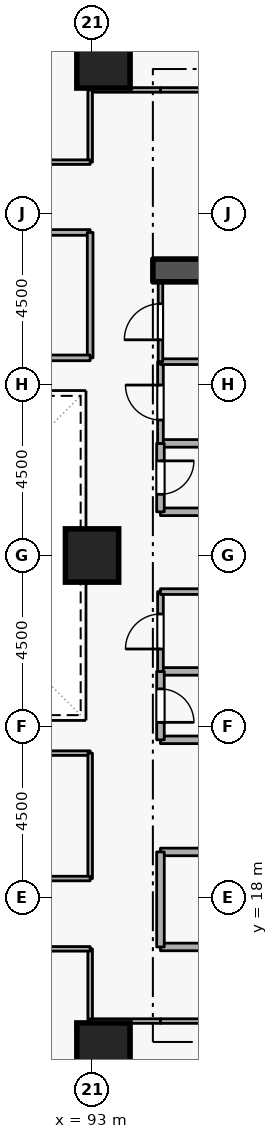
"""IFC4 building model, lengths in metres.
Left out: names, types, materials, properties, quantities, classifications, styles, units other than length and angle.
Written with IfcOpenShell. Run it as: python <this file> out.ifc"""

import sys

from ifc_helpers import new_model, si_unit, direction, frame, frame_2d, origin, origin_2d, place, context, subcontext, project, spatial, rectangle, extrude, element, fill, save


model = new_model("IFC4")
c1 = context("Model", 3, precision=1e-05, world=origin(), true_north=direction((0.0, 1.0)))
c2 = subcontext(c1, "Body", "Model", "MODEL_VIEW")
j1 = project(units=[si_unit("LENGTHUNIT", "METRE"), si_unit("PLANEANGLEUNIT", "RADIAN")], contexts=[c1])
p1 = place(None, origin())
s1 = spatial("IfcSite", under=j1, at=p1, CompositionType="ELEMENT")
p2 = place(p1, origin())
s2 = spatial("IfcBuilding", under=s1, at=p2, CompositionType="ELEMENT")
p3 = place(p2, frame((0.0, 0.0, 38.7)))
s3 = spatial("IfcBuildingStorey", under=s2, at=p3, CompositionType="ELEMENT", Elevation=38.7)
p4 = place(p3, frame((94.6, 34.5, 0.0), z_axis=(0.0, 0.0, 1.0), x_axis=(1.0, 0.0, 0.0)))
e1 = element("IfcWall", 1, at=p4, inside=s3, PredefinedType="SHEAR", context=c2, shape_type="SweptSolid", body=[
    extrude(rectangle(XDim=5.7, YDim=0.6, at=frame_2d((2.85, 0.0))), origin(), (0.0, 0.0, 1.0), 3.6),
])
for number, where, z_axis, x_axis in (
    (2, (93.3, 14.0, 0.0), (0.0, 0.0, 1.0), (1.0, 0.0, 0.0)),
    (3, (93.3, 40.0, 0.0), (0.0, 0.0, 1.0), (1.0, 0.0, 0.0)),
    (4, (93.0, 27.0, 0.0), (0.0, 0.0, 1.0), (1.0, 0.0, 0.0)),
):
    element("IfcColumn", number, at=place(p3, frame(where, z_axis=z_axis, x_axis=x_axis)), inside=s3, PredefinedType="COLUMN", context=c2, shape_type="SweptSolid", body=[
        extrude(rectangle(XDim=1.4, YDim=1.4, at=origin_2d()), origin(), (0.0, 0.0, 1.0), 3.6),
    ])
p5 = place(p3, frame((94.8, 16.7, 0.0), z_axis=(0.0, 0.0, 1.0), x_axis=(1.0, 0.0, 0.0)))
e5 = element("IfcWall", 5, at=p5, inside=s3, PredefinedType="STANDARD", context=c2, shape_type="SweptSolid", body=[
    extrude(rectangle(XDim=5.7, YDim=0.2, at=frame_2d((2.85, 0.0))), origin(), (0.0, 0.0, 1.0), 3.34),
])
p6 = place(p5, frame((2.275, 0.0, 0.0)))
e6 = element("IfcOpeningElement", 6, at=p6, cuts=e5, PredefinedType="OPENING", context=c2, shape_type="SweptSolid", body=[
    extrude(rectangle(XDim=1.15, YDim=2.1, at=frame_2d((0.575, 1.05))), frame((0.0, 0.11, 0.0), z_axis=(0.0, -1.0, 0.0), x_axis=(1.0, 0.0, 0.0)), (0.0, 0.0, 1.0), 0.22),
])
p7 = place(p3, frame((97.1, 19.2, 0.0), z_axis=(0.0, 0.0, 1.0), x_axis=(-1.0, 0.0, 0.0)))
e7 = element("IfcWall", 7, at=p7, inside=s3, PredefinedType="STANDARD", context=c2, shape_type="SweptSolid", body=[
    extrude(rectangle(XDim=2.3, YDim=0.2, at=frame_2d((1.15, 0.0))), origin(), (0.0, 0.0, 1.0), 2.545),
])
p8 = place(p3, frame((94.8, 19.2, 0.0), z_axis=(0.0, 0.0, 1.0), x_axis=(0.0, -1.0, 0.0)))
e8 = element("IfcWall", 8, at=p8, inside=s3, PredefinedType="STANDARD", context=c2, shape_type="SweptSolid", body=[
    extrude(rectangle(XDim=2.5, YDim=0.2, at=frame_2d((1.25, 0.0))), origin(), (0.0, 0.0, 1.0), 3.34),
])
for number, where, z_axis, x_axis in (
    (9, (94.8, 28.15, 0.0), (0.0, 0.0, 1.0), (1.0, 0.0, 0.0)),
    (10, (96.85, 29.95, 0.0), (0.0, 0.0, 1.0), (-1.0, 0.0, 0.0)),
):
    element("IfcWall", number, at=place(p3, frame(where, z_axis=z_axis, x_axis=x_axis)), inside=s3, PredefinedType="STANDARD", context=c2, shape_type="SweptSolid", body=[
        extrude(rectangle(XDim=2.05, YDim=0.2, at=frame_2d((1.025, 0.0))), origin(), (0.0, 0.0, 1.0), 3.34),
    ])
p9 = place(p3, frame((94.8, 29.95, 0.0), z_axis=(0.0, 0.0, 1.0), x_axis=(0.0, -1.0, 0.0)))
e11 = element("IfcWall", 11, at=p9, inside=s3, PredefinedType="STANDARD", context=c2, shape_type="SweptSolid", body=[
    extrude(rectangle(XDim=1.8, YDim=0.2, at=frame_2d((0.9, 0.0))), origin(), (0.0, 0.0, 1.0), 3.34),
])
p10 = place(p9, frame((0.46, 0.0, 0.0)))
e12 = element("IfcOpeningElement", 12, at=p10, cuts=e11, PredefinedType="OPENING", context=c2, shape_type="SweptSolid", body=[
    extrude(rectangle(XDim=0.88, YDim=2.04, at=frame_2d((0.44, 1.02))), frame((0.0, 0.11, 0.0), z_axis=(0.0, -1.0, 0.0), x_axis=(1.0, 0.0, 0.0)), (0.0, 0.0, 1.0), 0.22),
])
for number, where, z_axis, x_axis in (
    (13, (94.8, 22.15, 0.0), (0.0, 0.0, 1.0), (1.0, 0.0, 0.0)),
    (14, (96.85, 23.95, 0.0), (0.0, 0.0, 1.0), (-1.0, 0.0, 0.0)),
):
    element("IfcWall", number, at=place(p3, frame(where, z_axis=z_axis, x_axis=x_axis)), inside=s3, PredefinedType="STANDARD", context=c2, shape_type="SweptSolid", body=[
        extrude(rectangle(XDim=2.05, YDim=0.2, at=frame_2d((1.025, 0.0))), origin(), (0.0, 0.0, 1.0), 3.34),
    ])
p11 = place(p3, frame((94.8, 23.95, 0.0), z_axis=(0.0, 0.0, 1.0), x_axis=(0.0, -1.0, 0.0)))
e15 = element("IfcWall", 15, at=p11, inside=s3, PredefinedType="STANDARD", context=c2, shape_type="SweptSolid", body=[
    extrude(rectangle(XDim=1.8, YDim=0.2, at=frame_2d((0.9, 0.0))), origin(), (0.0, 0.0, 1.0), 3.34),
])
p12 = place(p11, frame((0.46, 0.0, 0.0)))
e16 = element("IfcOpeningElement", 16, at=p12, cuts=e15, PredefinedType="OPENING", context=c2, shape_type="SweptSolid", body=[
    extrude(rectangle(XDim=0.88, YDim=2.04, at=frame_2d((0.44, 1.02))), frame((0.0, 0.11, 0.0), z_axis=(0.0, -1.0, 0.0), x_axis=(1.0, 0.0, 0.0)), (0.0, 0.0, 1.0), 0.22),
])
p13 = place(p3, frame((94.8, 23.95, 0.0), z_axis=(0.0, 0.0, 1.0), x_axis=(0.0, 1.0, 0.0)))
e17 = element("IfcWall", 17, at=p13, inside=s3, PredefinedType="PARTITIONING", context=c2, shape_type="SweptSolid", body=[
    extrude(rectangle(XDim=2.1, YDim=0.15, at=frame_2d((1.05, 0.0))), origin(), (0.0, 0.0, 1.0), 3.34),
])
p14 = place(p13, frame((0.59, 0.0, 0.0)))
e18 = element("IfcOpeningElement", 18, at=p14, cuts=e17, PredefinedType="OPENING", context=c2, shape_type="SweptSolid", body=[
    extrude(rectangle(XDim=0.92, YDim=2.08, at=frame_2d((0.46, 1.04))), frame((0.0, 0.085, 0.0), z_axis=(0.0, -1.0, 0.0), x_axis=(1.0, 0.0, 0.0)), (0.0, 0.0, 1.0), 0.17),
])
p15 = place(p3, frame((94.8, 26.05, 0.0), z_axis=(0.0, 0.0, 1.0), x_axis=(1.0, 0.0, 0.0)))
e19 = element("IfcWall", 19, at=p15, inside=s3, PredefinedType="PARTITIONING", context=c2, shape_type="SweptSolid", body=[
    extrude(rectangle(XDim=2.05, YDim=0.15, at=frame_2d((1.025, 0.0))), origin(), (0.0, 0.0, 1.0), 3.34),
])
p16 = place(p3, frame((94.8, 29.95, 0.0), z_axis=(0.0, 0.0, 1.0), x_axis=(0.0, 1.0, 0.0)))
e20 = element("IfcWall", 20, at=p16, inside=s3, PredefinedType="PARTITIONING", context=c2, shape_type="SweptSolid", body=[
    extrude(rectangle(XDim=2.15, YDim=0.15, at=frame_2d((1.075, 0.0))), origin(), (0.0, 0.0, 1.0), 3.34),
])
p17 = place(p16, frame((0.615, 0.0, 0.0)))
e21 = element("IfcOpeningElement", 21, at=p17, cuts=e20, PredefinedType="OPENING", context=c2, shape_type="SweptSolid", body=[
    extrude(rectangle(XDim=0.92, YDim=2.08, at=frame_2d((0.46, 1.04))), frame((0.0, 0.085, 0.0), z_axis=(0.0, -1.0, 0.0), x_axis=(1.0, 0.0, 0.0)), (0.0, 0.0, 1.0), 0.17),
])
p18 = place(p3, frame((94.8, 32.1, 0.0), z_axis=(0.0, 0.0, 1.0), x_axis=(1.0, 0.0, 0.0)))
e22 = element("IfcWall", 22, at=p18, inside=s3, PredefinedType="PARTITIONING", context=c2, shape_type="SweptSolid", body=[
    extrude(rectangle(XDim=2.05, YDim=0.15, at=frame_2d((1.025, 0.0))), origin(), (0.0, 0.0, 1.0), 3.34),
])
p19 = place(p3, frame((94.8, 32.1, 0.0), z_axis=(0.0, 0.0, 1.0), x_axis=(0.0, 1.0, 0.0)))
e23 = element("IfcWall", 23, at=p19, inside=s3, PredefinedType="PARTITIONING", context=c2, shape_type="SweptSolid", body=[
    extrude(rectangle(XDim=2.1, YDim=0.12, at=frame_2d((1.05, 0.0))), origin(), (0.0, 0.0, 1.0), 3.34),
])
p20 = place(p19, frame((0.575, 0.0, 0.0)))
e24 = element("IfcOpeningElement", 24, at=p20, cuts=e23, PredefinedType="OPENING", context=c2, shape_type="SweptSolid", body=[
    extrude(rectangle(XDim=0.95, YDim=2.1, at=frame_2d((0.475, 1.05))), frame((0.0, 0.07, 0.0), z_axis=(0.0, -1.0, 0.0), x_axis=(1.0, 0.0, 0.0)), (0.0, 0.0, 1.0), 0.14),
])
p21 = place(p3, frame((92.95, 16.65, 0.0), z_axis=(0.0, 0.0, 1.0), x_axis=(0.0, -1.0, 0.0)))
e25 = element("IfcWall", 25, at=p21, inside=s3, PredefinedType="PARTITIONING", context=c2, shape_type="SweptSolid", body=[
    extrude(rectangle(XDim=1.9, YDim=0.12, at=frame_2d((0.95, 0.0))), origin(), (0.0, 0.0, 1.0), 3.34),
])
p22 = place(p3, frame((92.95, 14.75, 0.0), z_axis=(0.0, 0.0, 1.0), x_axis=(1.0, 0.0, 0.0)))
e26 = element("IfcWall", 26, at=p22, inside=s3, PredefinedType="PARTITIONING", context=c2, shape_type="SweptSolid", body=[
    extrude(rectangle(XDim=1.85, YDim=0.12, at=frame_2d((0.925, 0.0))), origin(), (0.0, 0.0, 1.0), 3.34),
])
p23 = place(p3, frame((94.8, 14.75, 0.0), z_axis=(0.0, 0.0, 1.0), x_axis=(1.0, 0.0, 0.0)))
e27 = element("IfcWall", 27, at=p23, inside=s3, PredefinedType="PARTITIONING", context=c2, shape_type="SweptSolid", body=[
    extrude(rectangle(XDim=9.35, YDim=0.12, at=frame_2d((4.675, 0.0))), origin(), (0.0, 0.0, 1.0), 3.34),
])
p24 = place(p23, frame((4.15, 0.0, 0.0)))
e28 = element("IfcOpeningElement", 28, at=p24, cuts=e27, PredefinedType="OPENING", context=c2, shape_type="SweptSolid", body=[
    extrude(rectangle(XDim=1.05, YDim=2.1, at=frame_2d((0.525, 1.05))), frame((0.0, 0.07, 0.0), z_axis=(0.0, -1.0, 0.0), x_axis=(1.0, 0.0, 0.0)), (0.0, 0.0, 1.0), 0.14),
])
p25 = place(p3, frame((88.5, 16.65, 0.0), z_axis=(0.0, 0.0, 1.0), x_axis=(1.0, 0.0, 0.0)))
e29 = element("IfcWall", 29, at=p25, inside=s3, PredefinedType="PARTITIONING", context=c2, shape_type="SweptSolid", body=[
    extrude(rectangle(XDim=4.45, YDim=0.12, at=frame_2d((2.225, 0.0))), origin(), (0.0, 0.0, 1.0), 3.34),
])
p26 = place(p3, frame((97.95, 39.25, 0.0), z_axis=(0.0, 0.0, 1.0), x_axis=(-1.0, 0.0, 0.0)))
e30 = element("IfcWall", 30, at=p26, inside=s3, PredefinedType="PARTITIONING", context=c2, shape_type="SweptSolid", body=[
    extrude(rectangle(XDim=3.15, YDim=0.12, at=frame_2d((1.575, 0.0))), origin(), (0.0, 0.0, 1.0), 3.34),
])
p27 = place(p3, frame((94.8, 39.25, 0.0), z_axis=(0.0, 0.0, 1.0), x_axis=(-1.0, 0.0, 0.0)))
e31 = element("IfcWall", 31, at=p27, inside=s3, PredefinedType="PARTITIONING", context=c2, shape_type="SweptSolid", body=[
    extrude(rectangle(XDim=1.85, YDim=0.12, at=frame_2d((0.925, 0.0))), origin(), (0.0, 0.0, 1.0), 3.34),
])
p28 = place(p3, frame((92.95, 39.25, 0.0), z_axis=(0.0, 0.0, 1.0), x_axis=(0.0, -1.0, 0.0)))
e32 = element("IfcWall", 32, at=p28, inside=s3, PredefinedType="PARTITIONING", context=c2, shape_type="SweptSolid", body=[
    extrude(rectangle(XDim=1.9, YDim=0.12, at=frame_2d((0.95, 0.0))), origin(), (0.0, 0.0, 1.0), 3.34),
])
p29 = place(p3, frame((92.95, 37.35, 0.0), z_axis=(0.0, 0.0, 1.0), x_axis=(-1.0, 0.0, 0.0)))
e33 = element("IfcWall", 33, at=p29, inside=s3, PredefinedType="PARTITIONING", context=c2, shape_type="SweptSolid", body=[
    extrude(rectangle(XDim=4.45, YDim=0.12, at=frame_2d((2.225, 0.0))), origin(), (0.0, 0.0, 1.0), 3.34),
])
p30 = place(p29, frame((1.7, 0.0, 0.0)))
e34 = element("IfcOpeningElement", 34, at=p30, cuts=e33, PredefinedType="OPENING", context=c2, shape_type="SweptSolid", body=[
    extrude(rectangle(XDim=1.05, YDim=2.1, at=frame_2d((0.525, 1.05))), frame((0.0, 0.07, 0.0), z_axis=(0.0, -1.0, 0.0), x_axis=(1.0, 0.0, 0.0)), (0.0, 0.0, 1.0), 0.14),
])
p31 = place(p3, frame((84.05, 35.5, 0.0), z_axis=(0.0, 0.0, 1.0), x_axis=(1.0, 0.0, 0.0)))
e35 = element("IfcWall", 35, at=p31, inside=s3, PredefinedType="PARTITIONING", context=c2, shape_type="SweptSolid", body=[
    extrude(rectangle(XDim=8.9, YDim=0.15, at=frame_2d((4.45, 0.0))), origin(), (0.0, 0.0, 1.0), 3.34),
])
p32 = place(p31, frame((3.8, 0.0, 0.0)))
e36 = element("IfcOpeningElement", 36, at=p32, cuts=e35, PredefinedType="OPENING", context=c2, shape_type="SweptSolid", body=[
    extrude(rectangle(XDim=1.3, YDim=2.12, at=frame_2d((0.65, 1.06))), frame((0.0, 0.085, 0.0), z_axis=(0.0, -1.0, 0.0), x_axis=(1.0, 0.0, 0.0)), (0.0, 0.0, 1.0), 0.17),
])
p33 = place(p3, frame((92.95, 35.5, 0.0), z_axis=(0.0, 0.0, 1.0), x_axis=(0.0, -1.0, 0.0)))
e37 = element("IfcWall", 37, at=p33, inside=s3, PredefinedType="PARTITIONING", context=c2, shape_type="SweptSolid", body=[
    extrude(rectangle(XDim=3.3, YDim=0.15, at=frame_2d((1.65, 0.0))), origin(), (0.0, 0.0, 1.0), 3.34),
])
p34 = place(p3, frame((92.95, 32.2, 0.0), z_axis=(0.0, 0.0, 1.0), x_axis=(-1.0, 0.0, 0.0)))
e38 = element("IfcWall", 38, at=p34, inside=s3, PredefinedType="PARTITIONING", context=c2, shape_type="SweptSolid", body=[
    extrude(rectangle(XDim=8.9, YDim=0.15, at=frame_2d((4.45, 0.0))), origin(), (0.0, 0.0, 1.0), 3.34),
])
p35 = place(p3, frame((84.05, 21.8, 0.0), z_axis=(0.0, 0.0, 1.0), x_axis=(1.0, 0.0, 0.0)))
e39 = element("IfcWall", 39, at=p35, inside=s3, PredefinedType="PARTITIONING", context=c2, shape_type="SweptSolid", body=[
    extrude(rectangle(XDim=8.9, YDim=0.12, at=frame_2d((4.45, 0.0))), origin(), (0.0, 0.0, 1.0), 3.34),
])
p36 = place(p3, frame((92.95, 21.8, 0.0), z_axis=(0.0, 0.0, 1.0), x_axis=(0.0, -1.0, 0.0)))
e40 = element("IfcWall", 40, at=p36, inside=s3, PredefinedType="PARTITIONING", context=c2, shape_type="SweptSolid", body=[
    extrude(rectangle(XDim=3.3, YDim=0.12, at=frame_2d((1.65, 0.0))), origin(), (0.0, 0.0, 1.0), 3.34),
])
p37 = place(p3, frame((92.95, 18.5, 0.0), z_axis=(0.0, 0.0, 1.0), x_axis=(-1.0, 0.0, 0.0)))
e41 = element("IfcWall", 41, at=p37, inside=s3, PredefinedType="PARTITIONING", context=c2, shape_type="SweptSolid", body=[
    extrude(rectangle(XDim=8.9, YDim=0.12, at=frame_2d((4.45, 0.0))), origin(), (0.0, 0.0, 1.0), 3.34),
])
p38 = place(p37, frame((3.975, 0.0, 0.0)))
e42 = element("IfcOpeningElement", 42, at=p38, cuts=e41, PredefinedType="OPENING", context=c2, shape_type="SweptSolid", body=[
    extrude(rectangle(XDim=0.95, YDim=2.1, at=frame_2d((0.475, 1.05))), frame((0.0, 0.07, 0.0), z_axis=(0.0, -1.0, 0.0), x_axis=(1.0, 0.0, 0.0)), (0.0, 0.0, 1.0), 0.14),
])
p39 = place(p10, origin())
e43 = element("IfcDoor", 43, at=p39, inside=s3, OperationType="SINGLE_SWING_LEFT", PredefinedType="DOOR", context=c2, shape_type="SweptSolid", body=[
    extrude(rectangle(XDim=0.88, YDim=2.04, at=frame_2d((0.44, 1.02))), frame((0.0, 0.025, 0.0), z_axis=(0.0, -1.0, 0.0), x_axis=(1.0, 0.0, 0.0)), (0.0, 0.0, 1.0), 0.05),
])
fill(e12, e43)
p40 = place(p12, origin())
e44 = element("IfcDoor", 44, at=p40, inside=s3, OperationType="SINGLE_SWING_RIGHT", PredefinedType="DOOR", context=c2, shape_type="SweptSolid", body=[
    extrude(rectangle(XDim=0.88, YDim=2.04, at=frame_2d((0.44, 1.02))), frame((0.0, 0.025, 0.0), z_axis=(0.0, -1.0, 0.0), x_axis=(1.0, 0.0, 0.0)), (0.0, 0.0, 1.0), 0.05),
])
fill(e16, e44)
p41 = place(p14, origin())
e45 = element("IfcDoor", 45, at=p41, inside=s3, OperationType="SINGLE_SWING_LEFT", PredefinedType="DOOR", context=c2, shape_type="SweptSolid", body=[
    extrude(rectangle(XDim=0.92, YDim=2.08, at=frame_2d((0.46, 1.04))), frame((0.0, 0.025, 0.0), z_axis=(0.0, -1.0, 0.0), x_axis=(1.0, 0.0, 0.0)), (0.0, 0.0, 1.0), 0.05),
])
fill(e18, e45)
p42 = place(p17, origin())
e46 = element("IfcDoor", 46, at=p42, inside=s3, OperationType="SINGLE_SWING_RIGHT", PredefinedType="DOOR", context=c2, shape_type="SweptSolid", body=[
    extrude(rectangle(XDim=0.92, YDim=2.08, at=frame_2d((0.46, 1.04))), frame((0.0, 0.025, 0.0), z_axis=(0.0, -1.0, 0.0), x_axis=(1.0, 0.0, 0.0)), (0.0, 0.0, 1.0), 0.05),
])
fill(e21, e46)
p43 = place(p20, origin())
e47 = element("IfcDoor", 47, at=p43, inside=s3, OperationType="SINGLE_SWING_LEFT", PredefinedType="DOOR", context=c2, shape_type="SweptSolid", body=[
    extrude(rectangle(XDim=0.95, YDim=2.1, at=frame_2d((0.475, 1.05))), frame((0.0, 0.025, 0.0), z_axis=(0.0, -1.0, 0.0), x_axis=(1.0, 0.0, 0.0)), (0.0, 0.0, 1.0), 0.05),
])
fill(e24, e47)
save(model, sys.argv[1])
